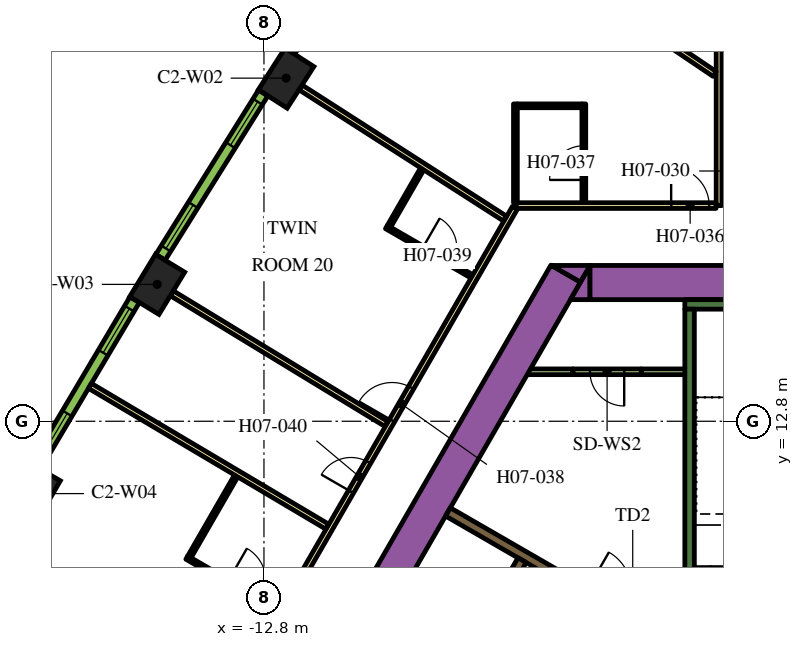
"""IFC4 building model, lengths in metres.
Left out: names, types, materials, properties, quantities, classifications, styles, units other than length and angle.
Written with IfcOpenShell. Run it as: python <this file> out.ifc"""

import sys

from ifc_helpers import new_model, si_unit, direction, frame, frame_2d, origin, origin_2d, place, context, subcontext, project, spatial, polyline, rectangle, outline, extrude, element, fill, save


model = new_model("IFC4")
c1 = context("Model", 3, precision=1e-05, world=origin(), true_north=direction((0.0, 1.0)))
c2 = subcontext(c1, "Body", "Model", "MODEL_VIEW")
j1 = project(units=[si_unit("LENGTHUNIT", "METRE"), si_unit("PLANEANGLEUNIT", "RADIAN")], contexts=[c1])
p1 = place(None, origin())
s1 = spatial("IfcSite", under=j1, at=p1, CompositionType="ELEMENT")
p2 = place(p1, origin())
s2 = spatial("IfcBuilding", under=s1, at=p2, CompositionType="ELEMENT")
p3 = place(p2, frame((0.0, 0.0, 99.3)))
s3 = spatial("IfcBuildingStorey", under=s2, at=p3, CompositionType="ELEMENT", Elevation=99.3)
for number, where, z_axis, x_axis in (
    (1, (-12.217, 21.828, 0.0), (0.0, 0.0, 1.0), (-0.54, -0.842, 0.0)),
    (2, (-15.609, 16.402, 0.0), (0.0, 0.0, 1.0), (-0.52, -0.854, 0.0)),
    (3, (-18.874, 10.897, 0.0), (0.0, 0.0, 1.0), (-0.5, -0.866, 0.0)),
):
    element("IfcColumn", number, at=place(p3, frame(where, z_axis=z_axis, x_axis=x_axis)), inside=s3, PredefinedType="COLUMN", context=c2, shape_type="SweptSolid", body=[
        extrude(rectangle(XDim=1.3, YDim=0.9, at=origin_2d()), origin(), (0.0, 0.0, 1.0), 3.9),
    ])
p4 = place(p3, frame((-15.36, -1.503, 0.0), z_axis=(0.0, 0.0, 1.0), x_axis=(0.50000389221, 0.866023156604, 0.0)))
e4 = element("IfcWall", 4, at=p4, inside=s3, PredefinedType="SOLIDWALL", context=c2, shape_type="SweptSolid", body=[
    extrude(rectangle(XDim=21.0, YDim=0.9, at=frame_2d((10.5, 0.0))), origin(), (0.0, 0.0, 1.0), 3.9),
])
p5 = place(p3, origin())
e5 = element("IfcWall", 5, at=p5, inside=s3, PredefinedType="SOLIDWALL", context=c2, shape_type="SweptSolid", body=[
    extrude(outline(polyline([(-4.215, 16.9), (-4.469, 16.46), (-5.231, 16.9), (-4.215, 16.9)])), origin(), (0.0, 0.0, 1.0), 3.9),
])
p6 = place(p3, frame((-4.224, 16.45, 0.0), z_axis=(0.0, 0.0, 1.0), x_axis=(1.0, 0.0, 0.0)))
e6 = element("IfcWall", 6, at=p6, inside=s3, PredefinedType="SOLIDWALL", context=c2, shape_type="SweptSolid", body=[
    extrude(rectangle(XDim=9.488, YDim=0.9, at=frame_2d((4.744, 0.0))), origin(), (0.0, 0.0, 1.0), 3.9),
])
e7 = element("IfcWall", 7, at=p5, inside=s3, PredefinedType="SOLIDWALL", context=c2, shape_type="SweptSolid", body=[
    extrude(outline(polyline([(-4.734, 16.0), (-4.226, 16.88), (-4.226, 16.0), (-4.734, 16.0)])), origin(), (0.0, 0.0, 1.0), 3.9),
])
p7 = place(p3, frame((-1.725, 15.875, 0.0), z_axis=(0.0, 0.0, 1.0), x_axis=(1.0, 0.0, 0.0)))
e8 = element("IfcWall", 8, at=p7, inside=s3, PredefinedType="SOLIDWALL", context=c2, shape_type="SweptSolid", body=[
    extrude(rectangle(XDim=3.45, YDim=0.25, at=frame_2d((1.725, 0.0))), origin(), (0.0, 0.0, 1.0), 3.9),
])
p8 = place(p3, frame((-1.6, 8.7, 0.0), z_axis=(0.0, 0.0, 1.0), x_axis=(0.0, 1.0, 0.0)))
e9 = element("IfcWall", 9, at=p8, inside=s3, PredefinedType="SOLIDWALL", context=c2, shape_type="SweptSolid", body=[
    extrude(rectangle(XDim=7.05, YDim=0.25, at=frame_2d((3.525, 0.0))), origin(), (0.0, 0.0, 1.0), 3.9),
])
p9 = place(p3, frame((-7.959, 10.415, 0.0), z_axis=(0.0, 0.0, 1.0), x_axis=(0.866020958405, -0.500007699544, 0.0)))
e10 = element("IfcWall", 10, at=p9, inside=s3, PredefinedType="SOLIDWALL", context=c2, shape_type="SweptSolid", body=[
    extrude(rectangle(XDim=4.1, YDim=0.25, at=frame_2d((2.05, 0.0))), origin(), (0.0, 0.0, 1.0), 3.9),
])
p10 = place(p3, frame((-5.851, 14.102, 0.0), z_axis=(0.0, 0.0, 1.0), x_axis=(1.0, 0.0, 0.0)))
e11 = element("IfcWall", 11, at=p10, inside=s3, PredefinedType="PARTITIONING", context=c2, shape_type="SweptSolid", body=[
    extrude(rectangle(XDim=1.18, YDim=0.15, at=frame_2d((0.59, 0.0))), origin(), (0.0, 0.0, 1.0), 2.75),
])
p11 = place(p3, frame((-2.871, 14.102, 0.0), z_axis=(0.0, 0.0, 1.0), x_axis=(1.0, 0.0, 0.0)))
e12 = element("IfcWall", 12, at=p11, inside=s3, PredefinedType="PARTITIONING", context=c2, shape_type="SweptSolid", body=[
    extrude(rectangle(XDim=1.196, YDim=0.15, at=frame_2d((0.598, 0.0))), origin(), (0.0, 0.0, 1.0), 2.75),
])
p12 = place(p3, frame((-6.008, 9.144, 0.0), z_axis=(0.0, 0.0, 1.0), x_axis=(-0.500006956611, -0.866021387346, 0.0)))
e13 = element("IfcWall", 13, at=p12, inside=s3, PredefinedType="SOLIDWALL", context=c2, shape_type="SweptSolid", body=[
    extrude(rectangle(XDim=9.83, YDim=0.25, at=frame_2d((4.915, 0.0))), origin(), (0.0, 0.0, 1.0), 3.9),
])
p13 = place(p12, frame((6.985, 0.0, 0.0)))
e14 = element("IfcOpeningElement", 14, at=p13, cuts=e13, PredefinedType="OPENING", context=c2, shape_type="SweptSolid", body=[
    extrude(rectangle(XDim=0.9, YDim=2.1, at=frame_2d((0.45, 1.05))), frame((0.0, 0.135, 0.0), z_axis=(0.0, -1.0, 0.0), x_axis=(1.0, 0.0, 0.0)), (0.0, 0.0, 1.0), 0.27),
])
p14 = place(p3, frame((-2.871, 14.102, 0.0), z_axis=(0.0, 0.0, 1.0), x_axis=(-1.0, 0.0, 0.0)))
e15 = element("IfcWall", 15, at=p14, inside=s3, PredefinedType="PARTITIONING", context=c2, shape_type="SweptSolid", body=[
    extrude(rectangle(XDim=1.8, YDim=0.15, at=frame_2d((0.9, 0.0))), origin(), (0.0, 0.0, 1.0), 2.75),
])
p15 = place(p14, frame((0.45, 0.0, 0.0)))
e16 = element("IfcOpeningElement", 16, at=p15, cuts=e15, PredefinedType="OPENING", context=c2, shape_type="SweptSolid", body=[
    extrude(rectangle(XDim=0.9, YDim=2.1, at=frame_2d((0.45, 1.05))), frame((0.0, 0.085, 0.0), z_axis=(0.0, -1.0, 0.0), x_axis=(1.0, 0.0, 0.0)), (0.0, 0.0, 1.0), 0.17),
])
p16 = place(p3, frame((-0.825, 18.475, 0.0), z_axis=(0.0, 0.0, 1.0), x_axis=(0.0, 1.0, 0.0)))
e17 = element("IfcWall", 17, at=p16, inside=s3, PredefinedType="PARTITIONING", context=c2, shape_type="SweptSolid", body=[
    extrude(rectangle(XDim=13.623, YDim=0.15, at=frame_2d((6.812, 0.0))), origin(), (0.0, 0.0, 1.0), 2.75),
])
p17 = place(p16, frame((4.135, 0.0, 0.0)))
e18 = element("IfcOpeningElement", 18, at=p17, cuts=e17, PredefinedType="OPENING", context=c2, shape_type="SweptSolid", body=[
    extrude(rectangle(XDim=1.0, YDim=2.1, at=frame_2d((0.5, 1.05))), frame((0.0, 0.085, 0.0), z_axis=(0.0, -1.0, 0.0), x_axis=(1.0, 0.0, 0.0)), (0.0, 0.0, 1.0), 0.17),
])
p18 = place(p3, frame((-6.163, 18.475, 0.0), z_axis=(0.0, 0.0, 1.0), x_axis=(1.0, 0.0, 0.0)))
e19 = element("IfcWall", 19, at=p18, inside=s3, PredefinedType="PARTITIONING", context=c2, shape_type="SweptSolid", body=[
    extrude(rectangle(XDim=5.258, YDim=0.15, at=frame_2d((2.629, 0.0))), origin(), (0.0, 0.0, 1.0), 2.75),
])
p19 = place(p18, frame((4.078, 0.0, 0.0)))
e20 = element("IfcOpeningElement", 20, at=p19, cuts=e19, PredefinedType="OPENING", context=c2, shape_type="SweptSolid", body=[
    extrude(rectangle(XDim=1.0, YDim=2.1, at=frame_2d((0.5, 1.05))), frame((0.0, 0.085, 0.0), z_axis=(0.0, -1.0, 0.0), x_axis=(1.0, 0.0, 0.0)), (0.0, 0.0, 1.0), 0.17),
])
p20 = place(p3, frame((-19.081, -3.9, 0.0), z_axis=(0.0, 0.0, 1.0), x_axis=(0.499998313975, 0.866026377209, 0.0)))
e21 = element("IfcWall", 21, at=p20, inside=s3, PredefinedType="PARTITIONING", context=c2, shape_type="SweptSolid", body=[
    extrude(rectangle(XDim=25.766, YDim=0.15, at=frame_2d((12.883, 0.0))), origin(), (0.0, 0.0, 1.0), 2.75),
])
p21 = place(p20, frame((19.306, 0.0, 0.0)))
e22 = element("IfcOpeningElement", 22, at=p21, cuts=e21, PredefinedType="OPENING", context=c2, shape_type="SweptSolid", body=[
    extrude(rectangle(XDim=1.0, YDim=2.1, at=frame_2d((0.5, 1.05))), frame((0.0, 0.085, 0.0), z_axis=(0.0, -1.0, 0.0), x_axis=(1.0, 0.0, 0.0)), (0.0, 0.0, 1.0), 0.17),
])
p22 = place(p20, frame((17.144, 0.0, 0.0)))
e23 = element("IfcOpeningElement", 23, at=p22, cuts=e21, PredefinedType="OPENING", context=c2, shape_type="SweptSolid", body=[
    extrude(rectangle(XDim=0.9, YDim=2.1, at=frame_2d((0.45, 1.05))), frame((0.0, 0.085, 0.0), z_axis=(0.0, -1.0, 0.0), x_axis=(1.0, 0.0, 0.0)), (0.0, 0.0, 1.0), 0.17),
])
p23 = place(p20, frame((9.955, 0.0, 0.0)))
e24 = element("IfcOpeningElement", 24, at=p23, cuts=e21, PredefinedType="OPENING", context=c2, shape_type="SweptSolid", body=[
    extrude(rectangle(XDim=1.1, YDim=2.1, at=frame_2d((0.55, 1.05))), frame((0.0, 0.085, 0.0), z_axis=(0.0, -1.0, 0.0), x_axis=(1.0, 0.0, 0.0)), (0.0, 0.0, 1.0), 0.17),
])
p24 = place(p20, frame((8.648, 0.0, 0.0)))
e25 = element("IfcOpeningElement", 25, at=p24, cuts=e21, PredefinedType="OPENING", context=c2, shape_type="SweptSolid", body=[
    extrude(rectangle(XDim=1.0, YDim=2.1, at=frame_2d((0.5, 1.05))), frame((0.0, 0.085, 0.0), z_axis=(0.0, -1.0, 0.0), x_axis=(1.0, 0.0, 0.0)), (0.0, 0.0, 1.0), 0.17),
])
p25 = place(p20, frame((1.553, 0.0, 0.0)))
e26 = element("IfcOpeningElement", 26, at=p25, cuts=e21, PredefinedType="OPENING", context=c2, shape_type="SweptSolid", body=[
    extrude(rectangle(XDim=0.9, YDim=2.1, at=frame_2d((0.45, 1.05))), frame((0.0, 0.085, 0.0), z_axis=(0.0, -1.0, 0.0), x_axis=(1.0, 0.0, 0.0)), (0.0, 0.0, 1.0), 0.17),
])
p26 = place(p3, frame((-17.379, 13.731, 0.0), z_axis=(0.0, 0.0, 1.0), x_axis=(0.860132461691, -0.510070728768, 0.0)))
e27 = element("IfcWall", 27, at=p26, inside=s3, PredefinedType="PARTITIONING", context=c2, shape_type="SweptSolid", body=[
    extrude(rectangle(XDim=7.257, YDim=0.15, at=frame_2d((3.628, 0.0))), origin(), (0.0, 0.0, 1.0), 2.75),
])
p27 = place(p3, frame((-15.225, 16.167, 0.0), z_axis=(0.0, 0.0, 1.0), x_axis=(0.854088713274, -0.520127359266, 0.0)))
e28 = element("IfcWall", 28, at=p27, inside=s3, PredefinedType="PARTITIONING", context=c2, shape_type="SweptSolid", body=[
    extrude(rectangle(XDim=6.611, YDim=0.15, at=frame_2d((3.305, 0.0))), origin(), (0.0, 0.0, 1.0), 2.75),
])
p28 = place(p3, frame((-11.838, 21.585, 0.0), z_axis=(0.0, 0.0, 1.0), x_axis=(0.841699322813, -0.539946525108, 0.0)))
e29 = element("IfcWall", 29, at=p28, inside=s3, PredefinedType="PARTITIONING", context=c2, shape_type="SweptSolid", body=[
    extrude(rectangle(XDim=6.392, YDim=0.15, at=frame_2d((3.196, 0.0))), origin(), (0.0, 0.0, 1.0), 2.75),
])
p29 = place(p3, frame((-8.326, 26.923, 0.0), z_axis=(0.0, 0.0, 1.0), x_axis=(0.828836601893, -0.5594907393, 0.0)))
e30 = element("IfcWall", 30, at=p29, inside=s3, PredefinedType="PARTITIONING", context=c2, shape_type="SweptSolid", body=[
    extrude(rectangle(XDim=8.909, YDim=0.15, at=frame_2d((4.455, 0.0))), origin(), (0.0, 0.0, 1.0), 2.75),
])
p30 = place(p3, frame((-4.383, 18.55, 0.0), z_axis=(0.0, 0.0, 1.0), x_axis=(0.0, 1.0, 0.0)))
e31 = element("IfcWall", 31, at=p30, inside=s3, PredefinedType="PARTITIONING", context=c2, shape_type="SweptSolid", body=[
    extrude(rectangle(XDim=2.6, YDim=0.1, at=frame_2d((1.3, 0.0))), origin(), (0.0, 0.0, 1.0), 2.75),
])
p31 = place(p30, frame((0.6, 0.0, 0.0)))
e32 = element("IfcOpeningElement", 32, at=p31, cuts=e31, PredefinedType="OPENING", context=c2, shape_type="SweptSolid", body=[
    extrude(rectangle(XDim=0.9, YDim=2.1, at=frame_2d((0.45, 1.05))), frame((0.0, 0.06, 0.0), z_axis=(0.0, -1.0, 0.0), x_axis=(1.0, 0.0, 0.0)), (0.0, 0.0, 1.0), 0.12),
])
p32 = place(p3, frame((-4.433, 21.1, 0.0), z_axis=(0.0, 0.0, 1.0), x_axis=(-1.0, 0.0, 0.0)))
e33 = element("IfcWall", 33, at=p32, inside=s3, PredefinedType="PARTITIONING", context=c2, shape_type="SweptSolid", body=[
    extrude(rectangle(XDim=1.7, YDim=0.1, at=frame_2d((0.85, 0.0))), origin(), (0.0, 0.0, 1.0), 2.75),
])
p33 = place(p3, frame((-6.183, 18.55, 0.0), z_axis=(0.0, 0.0, 1.0), x_axis=(0.0, 1.0, 0.0)))
e34 = element("IfcWall", 34, at=p33, inside=s3, PredefinedType="PARTITIONING", context=c2, shape_type="SweptSolid", body=[
    extrude(rectangle(XDim=2.6, YDim=0.1, at=frame_2d((1.3, 0.0))), origin(), (0.0, 0.0, 1.0), 2.75),
])
p34 = place(p3, frame((-9.578, 17.911, 0.0), z_axis=(0.0, 0.0, 1.0), x_axis=(0.866021400173, -0.500006934395, 0.0)))
e35 = element("IfcWall", 35, at=p34, inside=s3, PredefinedType="PARTITIONING", context=c2, shape_type="SweptSolid", body=[
    extrude(rectangle(XDim=2.6, YDim=0.1, at=frame_2d((1.3, 0.0))), origin(), (0.0, 0.0, 1.0), 2.75),
])
p35 = place(p34, frame((1.1, 0.0, 0.0)))
e36 = element("IfcOpeningElement", 36, at=p35, cuts=e35, PredefinedType="OPENING", context=c2, shape_type="SweptSolid", body=[
    extrude(rectangle(XDim=0.9, YDim=2.1, at=frame_2d((0.45, 1.05))), frame((0.0, 0.06, 0.0), z_axis=(0.0, -1.0, 0.0), x_axis=(1.0, 0.0, 0.0)), (0.0, 0.0, 1.0), 0.12),
])
p36 = place(p3, frame((-9.51, 17.929, 0.0), z_axis=(0.0, 0.0, 1.0), x_axis=(0.500062521093, 0.865989304205, 0.0)))
e37 = element("IfcWall", 37, at=p36, inside=s3, PredefinedType="PARTITIONING", context=c2, shape_type="SweptSolid", body=[
    extrude(rectangle(XDim=1.74, YDim=0.1, at=frame_2d((0.87, 0.0))), origin(), (0.0, 0.0, 1.0), 2.75),
])
p37 = place(p3, frame((-14.83, 9.213, 0.0), z_axis=(0.0, 0.0, 1.0), x_axis=(0.866034573852, -0.49998411664, 0.0)))
e38 = element("IfcWall", 38, at=p37, inside=s3, PredefinedType="PARTITIONING", context=c2, shape_type="SweptSolid", body=[
    extrude(rectangle(XDim=2.8, YDim=0.1, at=frame_2d((1.4, 0.0))), origin(), (0.0, 0.0, 1.0), 2.75),
])
p38 = place(p37, frame((1.25, 0.0, 0.0)))
e39 = element("IfcOpeningElement", 39, at=p38, cuts=e38, PredefinedType="OPENING", context=c2, shape_type="SweptSolid", body=[
    extrude(rectangle(XDim=1.0, YDim=2.1, at=frame_2d((0.5, 1.05))), frame((0.0, 0.06, 0.0), z_axis=(0.0, -1.0, 0.0), x_axis=(1.0, 0.0, 0.0)), (0.0, 0.0, 1.0), 0.12),
])
p39 = place(p3, frame((-14.762, 9.231, 0.0), z_axis=(0.0, 0.0, 1.0), x_axis=(0.500003092839, 0.866023618125, 0.0)))
e40 = element("IfcWall", 40, at=p39, inside=s3, PredefinedType="PARTITIONING", context=c2, shape_type="SweptSolid", body=[
    extrude(rectangle(XDim=2.46, YDim=0.1, at=frame_2d((1.23, 0.0))), origin(), (0.0, 0.0, 1.0), 2.75),
])
p40 = place(p3, frame((-9.311, 26.799, 0.0), z_axis=(0.0, 0.0, 1.0), x_axis=(-0.549741341923, -0.835334937005, 0.0)))
e41 = element("IfcWall", 41, at=p40, inside=s3, PredefinedType="SOLIDWALL", context=c2, shape_type="SweptSolid", body=[
    extrude(rectangle(XDim=5.1, YDim=0.29, at=frame_2d((2.55, 0.0))), origin(), (0.0, 0.0, 1.0), 3.65),
])
p41 = place(p40, frame((0.273, 0.0, 0.9)))
e42 = element("IfcOpeningElement", 42, at=p41, cuts=e41, PredefinedType="OPENING", context=c2, shape_type="SweptSolid", body=[
    extrude(rectangle(XDim=1.35, YDim=2.15, at=frame_2d((0.675, 1.075))), frame((0.0, 0.155, 0.0), z_axis=(0.0, -1.0, 0.0), x_axis=(1.0, 0.0, 0.0)), (0.0, 0.0, 1.0), 0.31),
])
p42 = place(p40, frame((3.478, 0.0, 0.9)))
e43 = element("IfcOpeningElement", 43, at=p42, cuts=e41, PredefinedType="OPENING", context=c2, shape_type="SweptSolid", body=[
    extrude(rectangle(XDim=1.35, YDim=2.15, at=frame_2d((0.675, 1.075))), frame((0.0, 0.155, 0.0), z_axis=(0.0, -1.0, 0.0), x_axis=(1.0, 0.0, 0.0)), (0.0, 0.0, 1.0), 0.31),
])
p43 = place(p3, frame((-12.82, 21.439, 0.0), z_axis=(0.0, 0.0, 1.0), x_axis=(-0.530072082134, -0.847952585787, 0.0)))
e44 = element("IfcWall", 44, at=p43, inside=s3, PredefinedType="SOLIDWALL", context=c2, shape_type="SweptSolid", body=[
    extrude(rectangle(XDim=5.1, YDim=0.29, at=frame_2d((2.55, 0.0))), origin(), (0.0, 0.0, 1.0), 3.65),
])
p44 = place(p43, frame((0.273, 0.0, 0.9)))
e45 = element("IfcOpeningElement", 45, at=p44, cuts=e44, PredefinedType="OPENING", context=c2, shape_type="SweptSolid", body=[
    extrude(rectangle(XDim=1.35, YDim=2.15, at=frame_2d((0.675, 1.075))), frame((0.0, 0.155, 0.0), z_axis=(0.0, -1.0, 0.0), x_axis=(1.0, 0.0, 0.0)), (0.0, 0.0, 1.0), 0.31),
])
p45 = place(p43, frame((3.478, 0.0, 0.9)))
e46 = element("IfcOpeningElement", 46, at=p45, cuts=e44, PredefinedType="OPENING", context=c2, shape_type="SweptSolid", body=[
    extrude(rectangle(XDim=1.35, YDim=2.15, at=frame_2d((0.675, 1.075))), frame((0.0, 0.155, 0.0), z_axis=(0.0, -1.0, 0.0), x_axis=(1.0, 0.0, 0.0)), (0.0, 0.0, 1.0), 0.31),
])
p46 = place(p3, frame((-16.203, 15.998, 0.0), z_axis=(0.0, 0.0, 1.0), x_axis=(-0.510054281659, -0.860142214847, 0.0)))
e47 = element("IfcWall", 47, at=p46, inside=s3, PredefinedType="SOLIDWALL", context=c2, shape_type="SweptSolid", body=[
    extrude(rectangle(XDim=5.101, YDim=0.29, at=frame_2d((2.55, 0.0))), origin(), (0.0, 0.0, 1.0), 3.65),
])
p47 = place(p46, frame((0.273, 0.0, 0.9)))
e48 = element("IfcOpeningElement", 48, at=p47, cuts=e47, PredefinedType="OPENING", context=c2, shape_type="SweptSolid", body=[
    extrude(rectangle(XDim=1.35, YDim=2.15, at=frame_2d((0.675, 1.075))), frame((0.0, 0.155, 0.0), z_axis=(0.0, -1.0, 0.0), x_axis=(1.0, 0.0, 0.0)), (0.0, 0.0, 1.0), 0.31),
])
p48 = place(p46, frame((3.478, 0.0, 0.9)))
e49 = element("IfcOpeningElement", 49, at=p48, cuts=e47, PredefinedType="OPENING", context=c2, shape_type="SweptSolid", body=[
    extrude(rectangle(XDim=1.35, YDim=2.15, at=frame_2d((0.675, 1.075))), frame((0.0, 0.155, 0.0), z_axis=(0.0, -1.0, 0.0), x_axis=(1.0, 0.0, 0.0)), (0.0, 0.0, 1.0), 0.31),
])
p49 = place(p15, origin())
e50 = element("IfcDoor", 50, at=p49, inside=s3, OperationType="SINGLE_SWING_LEFT", PredefinedType="DOOR", context=c2, shape_type="SweptSolid", body=[
    extrude(rectangle(XDim=0.9, YDim=2.1, at=frame_2d((0.45, 1.05))), frame((0.0, 0.025, 0.0), z_axis=(0.0, -1.0, 0.0), x_axis=(1.0, 0.0, 0.0)), (0.0, 0.0, 1.0), 0.05),
])
fill(e16, e50)
p50 = place(p19, origin())
e51 = element("IfcDoor", 51, at=p50, inside=s3, OperationType="SINGLE_SWING_RIGHT", PredefinedType="DOOR", context=c2, shape_type="SweptSolid", body=[
    extrude(rectangle(XDim=1.0, YDim=2.1, at=frame_2d((0.5, 1.05))), frame((0.0, 0.025, 0.0), z_axis=(0.0, -1.0, 0.0), x_axis=(1.0, 0.0, 0.0)), (0.0, 0.0, 1.0), 0.05),
])
fill(e20, e51)
p51 = place(p31, origin())
e52 = element("IfcDoor", 52, at=p51, inside=s3, OperationType="SINGLE_SWING_LEFT", PredefinedType="DOOR", context=c2, shape_type="SweptSolid", body=[
    extrude(rectangle(XDim=0.9, YDim=2.1, at=frame_2d((0.45, 1.05))), frame((0.0, 0.025, 0.0), z_axis=(0.0, -1.0, 0.0), x_axis=(1.0, 0.0, 0.0)), (0.0, 0.0, 1.0), 0.05),
])
fill(e32, e52)
p52 = place(p21, origin())
e53 = element("IfcDoor", 53, at=p52, inside=s3, OperationType="SINGLE_SWING_LEFT", PredefinedType="DOOR", context=c2, shape_type="SweptSolid", body=[
    extrude(rectangle(XDim=1.0, YDim=2.1, at=frame_2d((0.5, 1.05))), frame((0.0, 0.025, 0.0), z_axis=(0.0, -1.0, 0.0), x_axis=(1.0, 0.0, 0.0)), (0.0, 0.0, 1.0), 0.05),
])
fill(e22, e53)
p53 = place(p35, origin())
e54 = element("IfcDoor", 54, at=p53, inside=s3, OperationType="SINGLE_SWING_LEFT", PredefinedType="DOOR", context=c2, shape_type="SweptSolid", body=[
    extrude(rectangle(XDim=0.9, YDim=2.1, at=frame_2d((0.45, 1.05))), frame((0.0, 0.025, 0.0), z_axis=(0.0, -1.0, 0.0), x_axis=(1.0, 0.0, 0.0)), (0.0, 0.0, 1.0), 0.05),
])
fill(e36, e54)
p54 = place(p22, origin())
e55 = element("IfcDoor", 55, at=p54, inside=s3, OperationType="SINGLE_SWING_LEFT", PredefinedType="DOOR", context=c2, shape_type="SweptSolid", body=[
    extrude(rectangle(XDim=0.9, YDim=2.1, at=frame_2d((0.45, 1.05))), frame((0.0, 0.025, 0.0), z_axis=(0.0, -1.0, 0.0), x_axis=(1.0, 0.0, 0.0)), (0.0, 0.0, 1.0), 0.05),
])
fill(e23, e55)
p55 = place(p44, origin())
e56 = element("IfcWindow", 56, at=p55, inside=s3, PartitioningType="DOUBLE_PANEL_VERTICAL", PredefinedType="WINDOW", context=c2, shape_type="SweptSolid", body=[
    extrude(rectangle(XDim=1.35, YDim=2.15, at=frame_2d((0.675, 1.075))), frame((0.0, 0.015, 0.0), z_axis=(0.0, -1.0, 0.0), x_axis=(1.0, 0.0, 0.0)), (0.0, 0.0, 1.0), 0.06),
])
fill(e45, e56)
p56 = place(p45, origin())
e57 = element("IfcWindow", 57, at=p56, inside=s3, PartitioningType="DOUBLE_PANEL_VERTICAL", PredefinedType="WINDOW", context=c2, shape_type="SweptSolid", body=[
    extrude(rectangle(XDim=1.35, YDim=2.15, at=frame_2d((0.675, 1.075))), frame((0.0, 0.015, 0.0), z_axis=(0.0, -1.0, 0.0), x_axis=(1.0, 0.0, 0.0)), (0.0, 0.0, 1.0), 0.06),
])
fill(e46, e57)
p57 = place(p47, origin())
e58 = element("IfcWindow", 58, at=p57, inside=s3, PartitioningType="DOUBLE_PANEL_VERTICAL", PredefinedType="WINDOW", context=c2, shape_type="SweptSolid", body=[
    extrude(rectangle(XDim=1.35, YDim=2.15, at=frame_2d((0.675, 1.075))), frame((0.0, 0.015, 0.0), z_axis=(0.0, -1.0, 0.0), x_axis=(1.0, 0.0, 0.0)), (0.0, 0.0, 1.0), 0.06),
])
fill(e48, e58)
p58 = place(p48, origin())
e59 = element("IfcWindow", 59, at=p58, inside=s3, PartitioningType="DOUBLE_PANEL_VERTICAL", PredefinedType="WINDOW", context=c2, shape_type="SweptSolid", body=[
    extrude(rectangle(XDim=1.35, YDim=2.15, at=frame_2d((0.675, 1.075))), frame((0.0, 0.015, 0.0), z_axis=(0.0, -1.0, 0.0), x_axis=(1.0, 0.0, 0.0)), (0.0, 0.0, 1.0), 0.06),
])
fill(e49, e59)
save(model, sys.argv[1])
